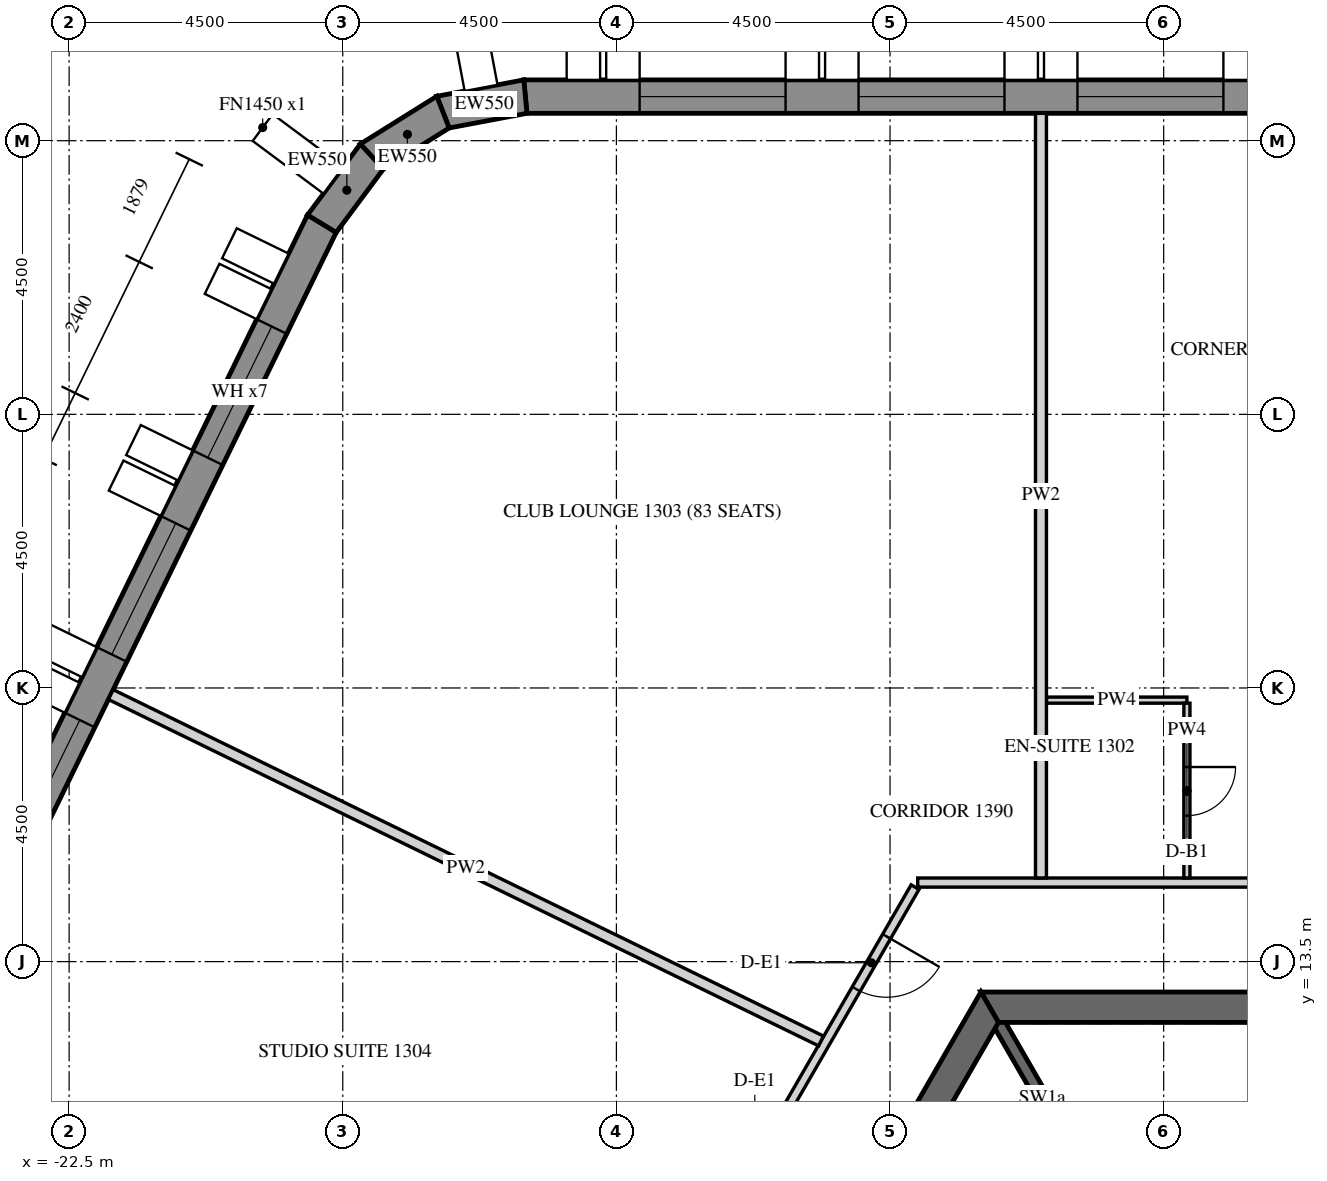
"""IFC4 building model, lengths in metres.
Left out: names, types, materials, properties, quantities, classifications, styles, units other than length and angle.
Written with IfcOpenShell. Run it as: python <this file> out.ifc"""

import sys

from ifc_helpers import new_model, si_unit, direction, frame, frame_2d, origin, place, context, subcontext, project, spatial, polyline, rectangle, outline, extrude, element, fill, save


model = new_model("IFC4")
c1 = context("Model", 3, precision=1e-05, world=origin(), true_north=direction((0.0, 1.0)))
c2 = subcontext(c1, "Body", "Model", "MODEL_VIEW")
j1 = project(units=[si_unit("LENGTHUNIT", "METRE"), si_unit("PLANEANGLEUNIT", "RADIAN")], contexts=[c1])
p1 = place(None, origin())
s1 = spatial("IfcSite", under=j1, at=p1, CompositionType="ELEMENT")
p2 = place(p1, origin())
s2 = spatial("IfcBuilding", under=s1, at=p2, CompositionType="ELEMENT")
p3 = place(p2, frame((0.0, 0.0, 176.1)))
s3 = spatial("IfcBuildingStorey", under=s2, at=p3, CompositionType="ELEMENT", Elevation=176.1)
p4 = place(p3, frame((12.761, 27.725, -0.15), z_axis=(0.0, 0.0, 1.0), x_axis=(-1.0, 0.0, 0.0)))
e1 = element("IfcWall", 1, at=p4, inside=s3, PredefinedType="SOLIDWALL", context=c2, shape_type="SweptSolid", body=[
    extrude(outline(polyline([(-0.022, -0.275), (27.783, -0.275), (27.732, 0.275), (0.022, 0.275), (-0.022, -0.275)])), origin(), (0.0, 0.0, 1.0), 3.9),
])
p5 = place(p4, frame((1.879, 0.0, 1.05)))
e2 = element("IfcOpeningElement", 2, at=p5, cuts=e1, PredefinedType="OPENING", context=c2, shape_type="SweptSolid", body=[
    extrude(rectangle(XDim=2.4, YDim=2.4, at=frame_2d((1.2, 1.2))), frame((0.0, 0.285, 0.0), z_axis=(0.0, -1.0, 0.0), x_axis=(1.0, 0.0, 0.0)), (0.0, 0.0, 1.0), 0.57),
])
p6 = place(p4, frame((5.479, 0.0, 1.05)))
e3 = element("IfcOpeningElement", 3, at=p6, cuts=e1, PredefinedType="OPENING", context=c2, shape_type="SweptSolid", body=[
    extrude(rectangle(XDim=2.4, YDim=2.4, at=frame_2d((1.2, 1.2))), frame((0.0, 0.285, 0.0), z_axis=(0.0, -1.0, 0.0), x_axis=(1.0, 0.0, 0.0)), (0.0, 0.0, 1.0), 0.57),
])
p7 = place(p4, frame((9.079, 0.0, 1.05)))
e4 = element("IfcOpeningElement", 4, at=p7, cuts=e1, PredefinedType="OPENING", context=c2, shape_type="SweptSolid", body=[
    extrude(rectangle(XDim=2.4, YDim=2.4, at=frame_2d((1.2, 1.2))), frame((0.0, 0.285, 0.0), z_axis=(0.0, -1.0, 0.0), x_axis=(1.0, 0.0, 0.0)), (0.0, 0.0, 1.0), 0.57),
])
p8 = place(p4, frame((12.679, 0.0, 1.05)))
e5 = element("IfcOpeningElement", 5, at=p8, cuts=e1, PredefinedType="OPENING", context=c2, shape_type="SweptSolid", body=[
    extrude(rectangle(XDim=2.4, YDim=2.4, at=frame_2d((1.2, 1.2))), frame((0.0, 0.285, 0.0), z_axis=(0.0, -1.0, 0.0), x_axis=(1.0, 0.0, 0.0)), (0.0, 0.0, 1.0), 0.57),
])
p9 = place(p4, frame((16.279, 0.0, 1.05)))
e6 = element("IfcOpeningElement", 6, at=p9, cuts=e1, PredefinedType="OPENING", context=c2, shape_type="SweptSolid", body=[
    extrude(rectangle(XDim=2.4, YDim=2.4, at=frame_2d((1.2, 1.2))), frame((0.0, 0.285, 0.0), z_axis=(0.0, -1.0, 0.0), x_axis=(1.0, 0.0, 0.0)), (0.0, 0.0, 1.0), 0.57),
])
p10 = place(p4, frame((19.879, 0.0, 1.05)))
e7 = element("IfcOpeningElement", 7, at=p10, cuts=e1, PredefinedType="OPENING", context=c2, shape_type="SweptSolid", body=[
    extrude(rectangle(XDim=2.4, YDim=2.4, at=frame_2d((1.2, 1.2))), frame((0.0, 0.285, 0.0), z_axis=(0.0, -1.0, 0.0), x_axis=(1.0, 0.0, 0.0)), (0.0, 0.0, 1.0), 0.57),
])
p11 = place(p4, frame((23.479, 0.0, 1.05)))
e8 = element("IfcOpeningElement", 8, at=p11, cuts=e1, PredefinedType="OPENING", context=c2, shape_type="SweptSolid", body=[
    extrude(rectangle(XDim=2.4, YDim=2.4, at=frame_2d((1.2, 1.2))), frame((0.0, 0.285, 0.0), z_axis=(0.0, -1.0, 0.0), x_axis=(1.0, 0.0, 0.0)), (0.0, 0.0, 1.0), 0.57),
])
p12 = place(p3, frame((-14.997, 27.725, -0.15), z_axis=(0.0, 0.0, 1.0), x_axis=(-0.982705443133, -0.185175624845, 0.0)))
e9 = element("IfcWall", 9, at=p12, inside=s3, PredefinedType="SOLIDWALL", context=c2, shape_type="SweptSolid", body=[
    extrude(outline(polyline([(-0.026, -0.275), (1.431, -0.275), (1.327, 0.275), (0.026, 0.275), (-0.026, -0.275)])), origin(), (0.0, 0.0, 1.0), 3.9),
])
p13 = place(p3, frame((-16.352, 27.47, -0.15), z_axis=(0.0, 0.0, 1.0), x_axis=(-0.848057977594, -0.5299034503, 0.0)))
e10 = element("IfcWall", 10, at=p13, inside=s3, PredefinedType="SOLIDWALL", context=c2, shape_type="SweptSolid", body=[
    extrude(outline(polyline([(-0.052, -0.275), (1.431, -0.275), (1.327, 0.275), (0.052, 0.275), (-0.052, -0.275)])), origin(), (0.0, 0.0, 1.0), 3.9),
])
p14 = place(p3, frame((-17.521, 26.739, -0.15), z_axis=(0.0, 0.0, 1.0), x_axis=(-0.597135295884, -0.802140535324, 0.0)))
e11 = element("IfcWall", 11, at=p14, inside=s3, PredefinedType="SOLIDWALL", context=c2, shape_type="SweptSolid", body=[
    extrude(outline(polyline([(-0.052, -0.275), (1.405, -0.275), (1.354, 0.275), (0.052, 0.275), (-0.052, -0.275)])), origin(), (0.0, 0.0, 1.0), 3.9),
])
p15 = place(p3, frame((-18.345, 25.633, -0.15), z_axis=(0.0, 0.0, 1.0), x_axis=(-0.43837181828, -0.898793718791, 0.0)))
e12 = element("IfcWall", 12, at=p15, inside=s3, PredefinedType="SOLIDWALL", context=c2, shape_type="SweptSolid", body=[
    extrude(outline(polyline([(-0.026, -0.275), (27.78, -0.275), (27.735, 0.275), (0.026, 0.275), (-0.026, -0.275)])), origin(), (0.0, 0.0, 1.0), 3.9),
])
p16 = place(p15, frame((1.879, 0.0, 1.05)))
e13 = element("IfcOpeningElement", 13, at=p16, cuts=e12, PredefinedType="OPENING", context=c2, shape_type="SweptSolid", body=[
    extrude(rectangle(XDim=2.4, YDim=2.4, at=frame_2d((1.2, 1.2))), frame((0.0, 0.285, 0.0), z_axis=(0.0, -1.0, 0.0), x_axis=(1.0, 0.0, 0.0)), (0.0, 0.0, 1.0), 0.57),
])
p17 = place(p15, frame((5.479, 0.0, 1.05)))
e14 = element("IfcOpeningElement", 14, at=p17, cuts=e12, PredefinedType="OPENING", context=c2, shape_type="SweptSolid", body=[
    extrude(rectangle(XDim=2.4, YDim=2.4, at=frame_2d((1.2, 1.2))), frame((0.0, 0.285, 0.0), z_axis=(0.0, -1.0, 0.0), x_axis=(1.0, 0.0, 0.0)), (0.0, 0.0, 1.0), 0.57),
])
p18 = place(p15, frame((9.079, 0.0, 1.05)))
e15 = element("IfcOpeningElement", 15, at=p18, cuts=e12, PredefinedType="OPENING", context=c2, shape_type="SweptSolid", body=[
    extrude(rectangle(XDim=2.4, YDim=2.4, at=frame_2d((1.2, 1.2))), frame((0.0, 0.285, 0.0), z_axis=(0.0, -1.0, 0.0), x_axis=(1.0, 0.0, 0.0)), (0.0, 0.0, 1.0), 0.57),
])
p19 = place(p15, frame((12.679, 0.0, 1.05)))
e16 = element("IfcOpeningElement", 16, at=p19, cuts=e12, PredefinedType="OPENING", context=c2, shape_type="SweptSolid", body=[
    extrude(rectangle(XDim=2.4, YDim=2.4, at=frame_2d((1.2, 1.2))), frame((0.0, 0.285, 0.0), z_axis=(0.0, -1.0, 0.0), x_axis=(1.0, 0.0, 0.0)), (0.0, 0.0, 1.0), 0.57),
])
p20 = place(p15, frame((16.279, 0.0, 1.05)))
e17 = element("IfcOpeningElement", 17, at=p20, cuts=e12, PredefinedType="OPENING", context=c2, shape_type="SweptSolid", body=[
    extrude(rectangle(XDim=2.4, YDim=2.4, at=frame_2d((1.2, 1.2))), frame((0.0, 0.285, 0.0), z_axis=(0.0, -1.0, 0.0), x_axis=(1.0, 0.0, 0.0)), (0.0, 0.0, 1.0), 0.57),
])
p21 = place(p15, frame((19.879, 0.0, 1.05)))
e18 = element("IfcOpeningElement", 18, at=p21, cuts=e12, PredefinedType="OPENING", context=c2, shape_type="SweptSolid", body=[
    extrude(rectangle(XDim=2.4, YDim=2.4, at=frame_2d((1.2, 1.2))), frame((0.0, 0.285, 0.0), z_axis=(0.0, -1.0, 0.0), x_axis=(1.0, 0.0, 0.0)), (0.0, 0.0, 1.0), 0.57),
])
p22 = place(p15, frame((23.479, 0.0, 1.05)))
e19 = element("IfcOpeningElement", 19, at=p22, cuts=e12, PredefinedType="OPENING", context=c2, shape_type="SweptSolid", body=[
    extrude(rectangle(XDim=2.4, YDim=2.4, at=frame_2d((1.2, 1.2))), frame((0.0, 0.285, 0.0), z_axis=(0.0, -1.0, 0.0), x_axis=(1.0, 0.0, 0.0)), (0.0, 0.0, 1.0), 0.57),
])
p23 = place(p3, frame((-7.361, 12.75, -0.15), z_axis=(0.0, 0.0, 1.0), x_axis=(-0.50000571537, -0.866022103989, 0.0)))
e20 = element("IfcWall", 20, at=p23, inside=s3, PredefinedType="SHEAR", context=c2, shape_type="SweptSolid", body=[
    extrude(outline(polyline([(-0.144, -0.25), (14.867, -0.25), (14.578, 0.25), (0.144, 0.25), (-0.144, -0.25)])), origin(), (0.0, 0.0, 1.0), 3.9),
])
p24 = place(p23, frame((6.49, 0.0, 0.15)))
e21 = element("IfcOpeningElement", 21, at=p24, cuts=e20, PredefinedType="OPENING", context=c2, shape_type="SweptSolid", body=[
    extrude(rectangle(XDim=1.8, YDim=2.4, at=frame_2d((0.9, 1.2))), frame((0.0, 0.26, 0.0), z_axis=(0.0, -1.0, 0.0), x_axis=(1.0, 0.0, 0.0)), (0.0, 0.0, 1.0), 0.52),
])
p25 = place(p3, frame((7.361, 12.75, -0.15), z_axis=(0.0, 0.0, 1.0), x_axis=(-1.0, 0.0, 0.0)))
e22 = element("IfcWall", 22, at=p25, inside=s3, PredefinedType="SHEAR", context=c2, shape_type="SweptSolid", body=[
    extrude(outline(polyline([(-0.144, -0.25), (14.866, -0.25), (14.578, 0.25), (0.144, 0.25), (-0.144, -0.25)])), origin(), (0.0, 0.0, 1.0), 3.9),
])
p26 = place(p25, frame((6.761, 0.0, 0.15)))
e23 = element("IfcOpeningElement", 23, at=p26, cuts=e22, PredefinedType="OPENING", context=c2, shape_type="SweptSolid", body=[
    extrude(rectangle(XDim=1.2, YDim=2.4, at=frame_2d((0.6, 1.2))), frame((0.0, 0.26, 0.0), z_axis=(0.0, -1.0, 0.0), x_axis=(1.0, 0.0, 0.0)), (0.0, 0.0, 1.0), 0.52),
])
p27 = place(p3, frame((-5.773, 10.0, -0.15), z_axis=(0.0, 0.0, 1.0), x_axis=(-0.499995765644, 0.866027848477, 0.0)))
e24 = element("IfcWall", 24, at=p27, inside=s3, PredefinedType="SHEAR", context=c2, shape_type="SweptSolid", body=[
    extrude(rectangle(XDim=2.887, YDim=0.2, at=frame_2d((1.443, 0.0))), origin(), (0.0, 0.0, 1.0), 3.9),
])
p28 = place(p3, frame((6.091, 14.8, 0.0), z_axis=(0.0, 0.0, 1.0), x_axis=(-1.0, 0.0, 0.0)))
e25 = element("IfcWall", 25, at=p28, inside=s3, PredefinedType="PARTITIONING", context=c2, shape_type="SweptSolid", body=[
    extrude(rectangle(XDim=14.636, YDim=0.15, at=frame_2d((7.318, 0.0))), origin(), (0.0, 0.0, 1.0), 2.988),
])
p29 = place(p28, frame((5.509, 0.0, 0.0)))
e26 = element("IfcOpeningElement", 26, at=p29, cuts=e25, PredefinedType="OPENING", context=c2, shape_type="SweptSolid", body=[
    extrude(rectangle(XDim=1.0, YDim=2.1, at=frame_2d((0.5, 1.05))), frame((0.0, 0.085, 0.0), z_axis=(0.0, -1.0, 0.0), x_axis=(1.0, 0.0, 0.0)), (0.0, 0.0, 1.0), 0.17),
])
p30 = place(p3, frame((-8.588, 14.725, 0.0), z_axis=(0.0, 0.0, 1.0), x_axis=(-0.499996322767, -0.866027526826, 0.0)))
e27 = element("IfcWall", 27, at=p30, inside=s3, PredefinedType="PARTITIONING", context=c2, shape_type="SweptSolid", body=[
    extrude(rectangle(XDim=14.636, YDim=0.15, at=frame_2d((7.318, 0.0))), origin(), (0.0, 0.0, 1.0), 2.988),
])
p31 = place(p30, frame((0.936, 0.0, 0.0)))
e28 = element("IfcOpeningElement", 28, at=p31, cuts=e27, PredefinedType="OPENING", context=c2, shape_type="SweptSolid", body=[
    extrude(rectangle(XDim=1.0, YDim=2.1, at=frame_2d((0.5, 1.05))), frame((0.0, 0.085, 0.0), z_axis=(0.0, -1.0, 0.0), x_axis=(1.0, 0.0, 0.0)), (0.0, 0.0, 1.0), 0.17),
])
p32 = place(p30, frame((4.771, 0.0, 0.0)))
e29 = element("IfcOpeningElement", 29, at=p32, cuts=e27, PredefinedType="OPENING", context=c2, shape_type="SweptSolid", body=[
    extrude(rectangle(XDim=1.0, YDim=2.1, at=frame_2d((0.5, 1.05))), frame((0.0, 0.085, 0.0), z_axis=(0.0, -1.0, 0.0), x_axis=(1.0, 0.0, 0.0)), (0.0, 0.0, 1.0), 0.17),
])
p33 = place(p30, frame((13.103, 0.0, 0.0)))
e30 = element("IfcOpeningElement", 30, at=p33, cuts=e27, PredefinedType="OPENING", context=c2, shape_type="SweptSolid", body=[
    extrude(rectangle(XDim=1.0, YDim=2.1, at=frame_2d((0.5, 1.05))), frame((0.0, 0.085, 0.0), z_axis=(0.0, -1.0, 0.0), x_axis=(1.0, 0.0, 0.0)), (0.0, 0.0, 1.0), 0.17),
])
p34 = place(p3, frame((-6.428, 17.8, 0.0), z_axis=(0.0, 0.0, 1.0), x_axis=(1.0, 0.0, 0.0)))
e31 = element("IfcWall", 31, at=p34, inside=s3, PredefinedType="PARTITIONING", context=c2, shape_type="SweptSolid", body=[
    extrude(rectangle(XDim=2.31, YDim=0.1, at=frame_2d((1.155, 0.0))), origin(), (0.0, 0.0, 1.0), 2.988),
])
p35 = place(p3, frame((-4.118, 17.75, 0.0), z_axis=(0.0, 0.0, 1.0), x_axis=(0.0, -1.0, 0.0)))
e32 = element("IfcWall", 32, at=p35, inside=s3, PredefinedType="PARTITIONING", context=c2, shape_type="SweptSolid", body=[
    extrude(rectangle(XDim=2.875, YDim=0.1, at=frame_2d((1.438, 0.0))), origin(), (0.0, 0.0, 1.0), 2.988),
])
p36 = place(p35, frame((1.05, 0.0, 0.0)))
e33 = element("IfcOpeningElement", 33, at=p36, cuts=e32, PredefinedType="OPENING", context=c2, shape_type="SweptSolid", body=[
    extrude(rectangle(XDim=0.8, YDim=2.1, at=frame_2d((0.4, 1.05))), frame((0.0, 0.06, 0.0), z_axis=(0.0, -1.0, 0.0), x_axis=(1.0, 0.0, 0.0)), (0.0, 0.0, 1.0), 0.12),
])
p37 = place(p3, frame((-6.518, 27.45, 0.0), z_axis=(0.0, 0.0, 1.0), x_axis=(0.0, -1.0, 0.0)))
e34 = element("IfcWall", 34, at=p37, inside=s3, PredefinedType="PARTITIONING", context=c2, shape_type="SweptSolid", body=[
    extrude(rectangle(XDim=12.575, YDim=0.18, at=frame_2d((6.288, 0.0))), origin(), (0.0, 0.0, 1.0), 2.988),
])
p38 = place(p3, frame((-21.815, 17.892, 0.0), z_axis=(0.0, 0.0, 1.0), x_axis=(0.898798778742, -0.43836144371, 0.0)))
e35 = element("IfcWall", 35, at=p38, inside=s3, PredefinedType="PARTITIONING", context=c2, shape_type="SweptSolid", body=[
    extrude(rectangle(XDim=12.994, YDim=0.18, at=frame_2d((6.497, 0.0))), origin(), (0.0, 0.0, 1.0), 2.988),
])
p39 = place(p3, frame((-24.971, 11.42, 0.0), z_axis=(0.0, 0.0, 1.0), x_axis=(0.898796996421, -0.438365098091, 0.0)))
e36 = element("IfcWall", 36, at=p39, inside=s3, PredefinedType="PARTITIONING", context=c2, shape_type="SweptSolid", body=[
    extrude(rectangle(XDim=12.491, YDim=0.18, at=frame_2d((6.246, 0.0))), origin(), (0.0, 0.0, 1.0), 2.988),
])
p40 = place(p9, frame((0.0, 0.205, 0.0)))
e37 = element("IfcWindow", 37, at=p40, inside=s3, PartitioningType="DOUBLE_PANEL_VERTICAL", PredefinedType="WINDOW", context=c2, shape_type="SweptSolid", body=[
    extrude(rectangle(XDim=2.4, YDim=2.4, at=frame_2d((1.2, 1.2))), frame((0.0, 0.03, 0.0), z_axis=(0.0, -1.0, 0.0), x_axis=(1.0, 0.0, 0.0)), (0.0, 0.0, 1.0), 0.06),
])
fill(e6, e37)
p41 = place(p10, frame((0.0, 0.205, 0.0)))
e38 = element("IfcWindow", 38, at=p41, inside=s3, PartitioningType="DOUBLE_PANEL_VERTICAL", PredefinedType="WINDOW", context=c2, shape_type="SweptSolid", body=[
    extrude(rectangle(XDim=2.4, YDim=2.4, at=frame_2d((1.2, 1.2))), frame((0.0, 0.03, 0.0), z_axis=(0.0, -1.0, 0.0), x_axis=(1.0, 0.0, 0.0)), (0.0, 0.0, 1.0), 0.06),
])
fill(e7, e38)
p42 = place(p11, frame((0.0, 0.205, 0.0)))
e39 = element("IfcWindow", 39, at=p42, inside=s3, PartitioningType="DOUBLE_PANEL_VERTICAL", PredefinedType="WINDOW", context=c2, shape_type="SweptSolid", body=[
    extrude(rectangle(XDim=2.4, YDim=2.4, at=frame_2d((1.2, 1.2))), frame((0.0, 0.03, 0.0), z_axis=(0.0, -1.0, 0.0), x_axis=(1.0, 0.0, 0.0)), (0.0, 0.0, 1.0), 0.06),
])
fill(e8, e39)
p43 = place(p16, frame((0.0, 0.205, 0.0)))
e40 = element("IfcWindow", 40, at=p43, inside=s3, PartitioningType="DOUBLE_PANEL_VERTICAL", PredefinedType="WINDOW", context=c2, shape_type="SweptSolid", body=[
    extrude(rectangle(XDim=2.4, YDim=2.4, at=frame_2d((1.2, 1.2))), frame((0.0, 0.03, 0.0), z_axis=(0.0, -1.0, 0.0), x_axis=(1.0, 0.0, 0.0)), (0.0, 0.0, 1.0), 0.06),
])
fill(e13, e40)
p44 = place(p17, frame((0.0, 0.205, 0.0)))
e41 = element("IfcWindow", 41, at=p44, inside=s3, PartitioningType="DOUBLE_PANEL_VERTICAL", PredefinedType="WINDOW", context=c2, shape_type="SweptSolid", body=[
    extrude(rectangle(XDim=2.4, YDim=2.4, at=frame_2d((1.2, 1.2))), frame((0.0, 0.03, 0.0), z_axis=(0.0, -1.0, 0.0), x_axis=(1.0, 0.0, 0.0)), (0.0, 0.0, 1.0), 0.06),
])
fill(e14, e41)
p45 = place(p18, frame((0.0, 0.205, 0.0)))
e42 = element("IfcWindow", 42, at=p45, inside=s3, PartitioningType="DOUBLE_PANEL_VERTICAL", PredefinedType="WINDOW", context=c2, shape_type="SweptSolid", body=[
    extrude(rectangle(XDim=2.4, YDim=2.4, at=frame_2d((1.2, 1.2))), frame((0.0, 0.03, 0.0), z_axis=(0.0, -1.0, 0.0), x_axis=(1.0, 0.0, 0.0)), (0.0, 0.0, 1.0), 0.06),
])
fill(e15, e42)
p46 = place(p36, origin())
e43 = element("IfcDoor", 43, at=p46, inside=s3, OperationType="SINGLE_SWING_LEFT", PredefinedType="DOOR", context=c2, shape_type="SweptSolid", body=[
    extrude(rectangle(XDim=0.8, YDim=2.1, at=frame_2d((0.4, 1.05))), frame((0.0, 0.025, 0.0), z_axis=(0.0, -1.0, 0.0), x_axis=(1.0, 0.0, 0.0)), (0.0, 0.0, 1.0), 0.05),
])
fill(e33, e43)
p47 = place(p31, origin())
e44 = element("IfcDoor", 44, at=p47, inside=s3, OperationType="SINGLE_SWING_RIGHT", PredefinedType="DOOR", context=c2, shape_type="SweptSolid", body=[
    extrude(rectangle(XDim=1.0, YDim=2.1, at=frame_2d((0.5, 1.05))), frame((0.0, 0.025, 0.0), z_axis=(0.0, -1.0, 0.0), x_axis=(1.0, 0.0, 0.0)), (0.0, 0.0, 1.0), 0.05),
])
fill(e28, e44)
save(model, sys.argv[1])
